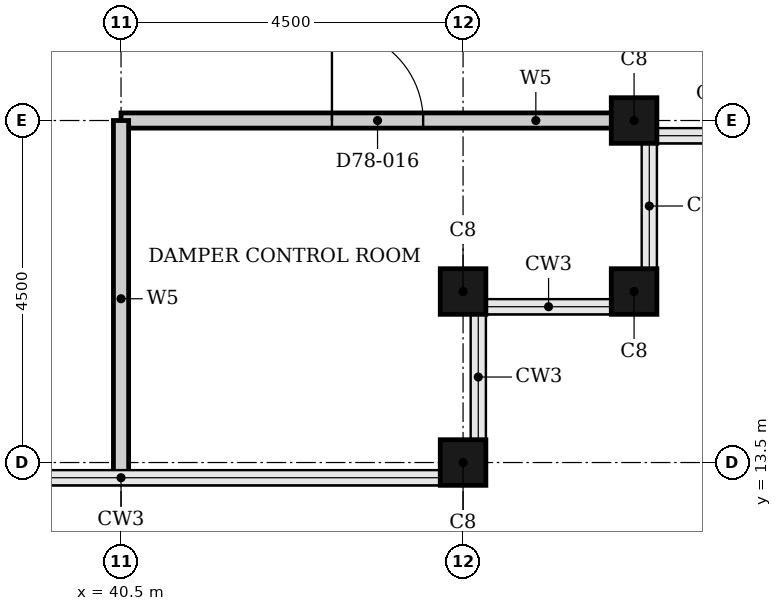
"""IFC4 building model, lengths in metres.
Left out: names, types, materials, properties, quantities, classifications, styles, units other than length and angle.
Written with IfcOpenShell. Run it as: python <this file> out.ifc"""

import sys

from ifc_helpers import new_model, si_unit, direction, frame, frame_2d, origin, origin_2d, place, context, subcontext, project, spatial, rectangle, hollow_rectangle, extrude, element, fill, save


model = new_model("IFC4")
c1 = context("Model", 3, precision=1e-05, world=origin(), true_north=direction((0.0, 1.0)))
c2 = subcontext(c1, "Body", "Model", "MODEL_VIEW")
j1 = project(units=[si_unit("LENGTHUNIT", "METRE"), si_unit("PLANEANGLEUNIT", "RADIAN")], contexts=[c1])
p1 = place(None, origin())
s1 = spatial("IfcSite", under=j1, at=p1, CompositionType="ELEMENT")
p2 = place(p1, origin())
s2 = spatial("IfcBuilding", under=s1, at=p2, CompositionType="ELEMENT")
p3 = place(p2, frame((0.0, 0.0, 305.6)))
s3 = spatial("IfcBuildingStorey", under=s2, at=p3, CompositionType="ELEMENT", Elevation=305.6)
for number, where, z_axis, x_axis in (
    (1, (45.0, 13.5, 0.0), (0.0, 0.0, 1.0), (1.0, 0.0, 0.0)),
    (2, (45.0, 15.75, 0.0), (0.0, 0.0, 1.0), (1.0, 0.0, 0.0)),
    (3, (47.25, 15.75, 0.0), (0.0, 0.0, 1.0), (1.0, 0.0, 0.0)),
    (4, (47.25, 18.0, 0.0), (0.0, 0.0, 1.0), (1.0, 0.0, 0.0)),
):
    element("IfcColumn", number, at=place(p3, frame(where, z_axis=z_axis, x_axis=x_axis)), inside=s3, PredefinedType="COLUMN", context=c2, shape_type="SweptSolid", body=[
        extrude(hollow_rectangle(XDim=0.6, YDim=0.6, WallThickness=0.02, at=origin_2d()), origin(), (0.0, 0.0, 1.0), 7.2),
    ])
p4 = place(p3, frame((40.5, 18.0, 0.0), z_axis=(0.0, 0.0, 1.0), x_axis=(1.0, 0.0, 0.0)))
e5 = element("IfcWall", 5, at=p4, inside=s3, PredefinedType="PARTITIONING", context=c2, shape_type="SweptSolid", body=[
    extrude(rectangle(XDim=6.94, YDim=0.2, at=frame_2d((3.47, 0.0))), origin(), (0.0, 0.0, 1.0), 6.08),
])
p5 = place(p4, frame((2.775, 0.0, 0.0)))
e6 = element("IfcOpeningElement", 6, at=p5, cuts=e5, PredefinedType="OPENING", context=c2, shape_type="SweptSolid", body=[
    extrude(rectangle(XDim=1.2, YDim=2.1, at=frame_2d((0.6, 1.05))), frame((0.0, 0.11, 0.0), z_axis=(0.0, -1.0, 0.0), x_axis=(1.0, 0.0, 0.0)), (0.0, 0.0, 1.0), 0.22),
])
p6 = place(p3, frame((40.5, 13.31, 0.0), z_axis=(0.0, 0.0, 1.0), x_axis=(0.0, 1.0, 0.0)))
e7 = element("IfcWall", 7, at=p6, inside=s3, PredefinedType="PARTITIONING", context=c2, shape_type="SweptSolid", body=[
    extrude(rectangle(XDim=4.69, YDim=0.2, at=frame_2d((2.345, 0.0))), origin(), (0.0, 0.0, 1.0), 6.9),
])
p7 = place(p5, origin())
e8 = element("IfcDoor", 8, at=p7, inside=s3, OperationType="SINGLE_SWING_RIGHT", PredefinedType="DOOR", context=c2, shape_type="SweptSolid", body=[
    extrude(rectangle(XDim=1.2, YDim=2.1, at=frame_2d((0.6, 1.05))), frame((0.0, 0.025, 0.0), z_axis=(0.0, -1.0, 0.0), x_axis=(1.0, 0.0, 0.0)), (0.0, 0.0, 1.0), 0.05),
])
fill(e6, e8)
save(model, sys.argv[1])
